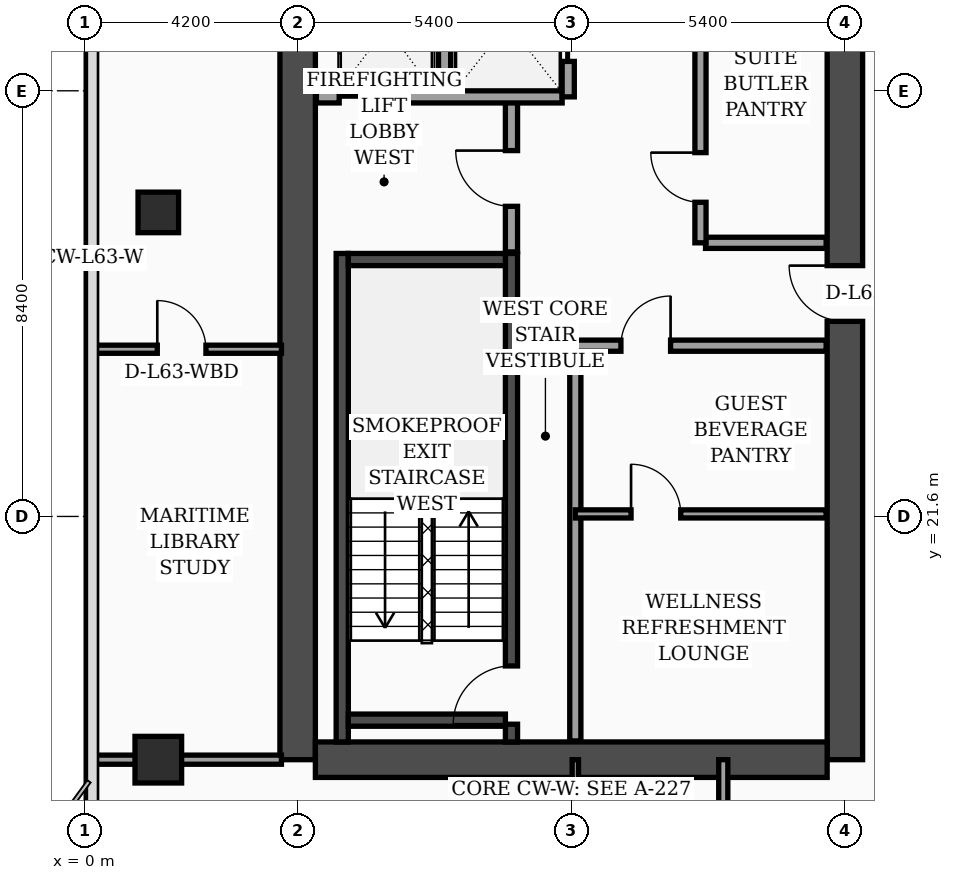
"""IFC4 building model, lengths in metres.
Left out: names, types, materials, properties, quantities, classifications, styles, units other than length and angle.
Written with IfcOpenShell. Run it as: python <this file> out.ifc"""

import sys

from ifc_helpers import new_model, si_unit, direction, frame, frame_2d, origin, origin_2d, place, context, subcontext, project, spatial, rectangle, extrude, element, fill, save


model = new_model("IFC4")
c1 = context("Model", 3, precision=1e-05, world=origin(), true_north=direction((0.0, 1.0)))
c2 = subcontext(c1, "Body", "Model", "MODEL_VIEW")
j1 = project(units=[si_unit("LENGTHUNIT", "METRE"), si_unit("PLANEANGLEUNIT", "RADIAN")], contexts=[c1])
p1 = place(None, origin())
s1 = spatial("IfcSite", under=j1, at=p1, CompositionType="ELEMENT")
p2 = place(p1, origin())
s2 = spatial("IfcBuilding", under=s1, at=p2, CompositionType="ELEMENT")
p3 = place(p2, frame((0.0, 0.0, 255.2)))
s3 = spatial("IfcBuildingStorey", under=s2, at=p3, CompositionType="ELEMENT", Elevation=255.2)
p4 = place(p3, frame((4.2, 16.8, 0.0), z_axis=(0.0, 0.0, 1.0), x_axis=(0.0, 1.0, 0.0)))
e1 = element("IfcWall", 1, at=p4, inside=s3, PredefinedType="SHEAR", context=c2, shape_type="SweptSolid", body=[
    extrude(rectangle(XDim=21.6, YDim=0.7, at=frame_2d((10.8, 0.0))), origin(), (0.0, 0.0, 1.0), 3.56),
])
p5 = place(p3, frame((15.0, 16.8, 0.0), z_axis=(0.0, 0.0, 1.0), x_axis=(0.0, 1.0, 0.0)))
e2 = element("IfcWall", 2, at=p5, inside=s3, PredefinedType="SHEAR", context=c2, shape_type="SweptSolid", body=[
    extrude(rectangle(XDim=21.6, YDim=0.7, at=frame_2d((10.8, 0.0))), origin(), (0.0, 0.0, 1.0), 3.56),
])
p6 = place(p5, frame((8.65, 0.0, 0.0)))
e3 = element("IfcOpeningElement", 3, at=p6, cuts=e2, PredefinedType="OPENING", context=c2, shape_type="SweptSolid", body=[
    extrude(rectangle(XDim=1.1, YDim=2.2, at=frame_2d((0.55, 1.1))), frame((0.0, 0.36, 0.0), z_axis=(0.0, -1.0, 0.0), x_axis=(1.0, 0.0, 0.0)), (0.0, 0.0, 1.0), 0.72),
])
p7 = place(p5, frame((18.9, 0.0, 0.0)))
e4 = element("IfcOpeningElement", 4, at=p7, cuts=e2, PredefinedType="OPENING", context=c2, shape_type="SweptSolid", body=[
    extrude(rectangle(XDim=1.1, YDim=2.2, at=frame_2d((0.55, 1.1))), frame((0.0, 0.36, 0.0), z_axis=(0.0, -1.0, 0.0), x_axis=(1.0, 0.0, 0.0)), (0.0, 0.0, 1.0), 0.72),
])
p8 = place(p3, frame((4.55, 16.8, 0.0), z_axis=(0.0, 0.0, 1.0), x_axis=(1.0, 0.0, 0.0)))
e5 = element("IfcWall", 5, at=p8, inside=s3, PredefinedType="SHEAR", context=c2, shape_type="SweptSolid", body=[
    extrude(rectangle(XDim=10.1, YDim=0.7, at=frame_2d((5.05, 0.0))), origin(), (0.0, 0.0, 1.0), 3.56),
])
p9 = place(p3, frame((5.08, 17.15, 0.0), z_axis=(0.0, 0.0, 1.0), x_axis=(0.0, 1.0, 0.0)))
e6 = element("IfcWall", 6, at=p9, inside=s3, PredefinedType="SOLIDWALL", context=c2, shape_type="SweptSolid", body=[
    extrude(rectangle(XDim=9.64, YDim=0.24, at=frame_2d((4.82, 0.0))), origin(), (0.0, 0.0, 1.0), 3.56),
])
p10 = place(p3, frame((8.42, 17.15, 0.0), z_axis=(0.0, 0.0, 1.0), x_axis=(0.0, 1.0, 0.0)))
e7 = element("IfcWall", 7, at=p10, inside=s3, PredefinedType="SOLIDWALL", context=c2, shape_type="SweptSolid", body=[
    extrude(rectangle(XDim=9.64, YDim=0.24, at=frame_2d((4.82, 0.0))), origin(), (0.0, 0.0, 1.0), 3.56),
])
p11 = place(p10, frame((0.35, 0.0, 0.0)))
e8 = element("IfcOpeningElement", 8, at=p11, cuts=e7, PredefinedType="OPENING", context=c2, shape_type="SweptSolid", body=[
    extrude(rectangle(XDim=1.15, YDim=2.2, at=frame_2d((0.575, 1.1))), frame((0.0, 0.13, 0.0), z_axis=(0.0, -1.0, 0.0), x_axis=(1.0, 0.0, 0.0)), (0.0, 0.0, 1.0), 0.26),
])
for number, where, z_axis, x_axis in (
    (9, (5.2, 17.58, 0.0), (0.0, 0.0, 1.0), (1.0, 0.0, 0.0)),
    (10, (5.2, 26.67, 0.0), (0.0, 0.0, 1.0), (1.0, 0.0, 0.0)),
):
    element("IfcWall", number, at=place(p3, frame(where, z_axis=z_axis, x_axis=x_axis)), inside=s3, PredefinedType="SOLIDWALL", context=c2, shape_type="SweptSolid", body=[
        extrude(rectangle(XDim=3.1, YDim=0.24, at=frame_2d((1.55, 0.0))), origin(), (0.0, 0.0, 1.0), 3.56),
    ])
p12 = place(p3, frame((1.45, 16.8, 0.0), z_axis=(0.0, 0.0, 1.0), x_axis=(1.0, 0.0, 0.0)))
e11 = element("IfcColumn", 11, at=p12, inside=s3, PredefinedType="COLUMN", context=c2, shape_type="SweptSolid", body=[
    extrude(rectangle(XDim=0.92, YDim=0.92, at=origin_2d()), origin(), (0.0, 0.0, 1.0), 3.56),
])
p13 = place(p3, frame((1.45, 27.6, 0.0), z_axis=(0.0, 0.0, 1.0), x_axis=(1.0, 0.0, 0.0)))
e12 = element("IfcColumn", 12, at=p13, inside=s3, PredefinedType="COLUMN", context=c2, shape_type="SweptSolid", body=[
    extrude(rectangle(XDim=0.8, YDim=0.8, at=origin_2d()), origin(), (0.0, 0.0, 1.0), 3.56),
])
p14 = place(p3, frame((8.42, 26.82, 0.0), z_axis=(0.0, 0.0, 1.0), x_axis=(0.0, 1.0, 0.0)))
e13 = element("IfcWall", 13, at=p14, inside=s3, PredefinedType="SOLIDWALL", context=c2, shape_type="SweptSolid", body=[
    extrude(rectangle(XDim=3.0, YDim=0.24, at=frame_2d((1.5, 0.0))), origin(), (0.0, 0.0, 1.0), 3.56),
])
p15 = place(p14, frame((0.9, 0.0, 0.0)))
e14 = element("IfcOpeningElement", 14, at=p15, cuts=e13, PredefinedType="OPENING", context=c2, shape_type="SweptSolid", body=[
    extrude(rectangle(XDim=1.1, YDim=2.2, at=frame_2d((0.55, 1.1))), frame((0.0, 0.13, 0.0), z_axis=(0.0, -1.0, 0.0), x_axis=(1.0, 0.0, 0.0)), (0.0, 0.0, 1.0), 0.26),
])
p16 = place(p3, frame((4.57, 29.88, 0.0), z_axis=(0.0, 0.0, 1.0), x_axis=(1.0, 0.0, 0.0)))
e15 = element("IfcWall", 15, at=p16, inside=s3, PredefinedType="SOLIDWALL", context=c2, shape_type="SweptSolid", body=[
    extrude(rectangle(XDim=4.85, YDim=0.24, at=frame_2d((2.425, 0.0))), origin(), (0.0, 0.0, 1.0), 3.56),
])
p17 = place(p16, frame((0.45, 0.0, 0.0)))
e16 = element("IfcOpeningElement", 16, at=p17, cuts=e15, PredefinedType="OPENING", context=c2, shape_type="SweptSolid", body=[
    extrude(rectangle(XDim=1.3, YDim=2.35, at=frame_2d((0.65, 1.175))), frame((0.0, 0.13, 0.0), z_axis=(0.0, -1.0, 0.0), x_axis=(1.0, 0.0, 0.0)), (0.0, 0.0, 1.0), 0.26),
])
p18 = place(p3, frame((7.1, 30.02, 0.0), z_axis=(0.0, 0.0, 1.0), x_axis=(0.0, 1.0, 0.0)))
e17 = element("IfcWall", 17, at=p18, inside=s3, PredefinedType="SOLIDWALL", context=c2, shape_type="SweptSolid", body=[
    extrude(rectangle(XDim=2.63, YDim=0.24, at=frame_2d((1.315, 0.0))), origin(), (0.0, 0.0, 1.0), 3.56),
])
p19 = place(p3, frame((9.54, 29.88, 0.0), z_axis=(0.0, 0.0, 1.0), x_axis=(0.0, 1.0, 0.0)))
e18 = element("IfcWall", 18, at=p19, inside=s3, PredefinedType="SOLIDWALL", context=c2, shape_type="SweptSolid", body=[
    extrude(rectangle(XDim=2.9, YDim=0.24, at=frame_2d((1.45, 0.0))), origin(), (0.0, 0.0, 1.0), 3.56),
])
p20 = place(p19, frame((0.7, 0.0, 0.0)))
e19 = element("IfcOpeningElement", 19, at=p20, cuts=e18, PredefinedType="OPENING", context=c2, shape_type="SweptSolid", body=[
    extrude(rectangle(XDim=1.3, YDim=2.35, at=frame_2d((0.65, 1.175))), frame((0.0, 0.13, 0.0), z_axis=(0.0, -1.0, 0.0), x_axis=(1.0, 0.0, 0.0)), (0.0, 0.0, 1.0), 0.26),
])
p21 = place(p3, frame((9.68, 17.17, 0.0), z_axis=(0.0, 0.0, 1.0), x_axis=(0.0, 1.0, 0.0)))
e20 = element("IfcWall", 20, at=p21, inside=s3, PredefinedType="SOLIDWALL", context=c2, shape_type="SweptSolid", body=[
    extrude(rectangle(XDim=7.83, YDim=0.22, at=frame_2d((3.915, 0.0))), origin(), (0.0, 0.0, 1.0), 3.56),
])
p22 = place(p3, frame((9.68, 21.65, 0.0), z_axis=(0.0, 0.0, 1.0), x_axis=(1.0, 0.0, 0.0)))
e21 = element("IfcWall", 21, at=p22, inside=s3, PredefinedType="PARTITIONING", context=c2, shape_type="SweptSolid", body=[
    extrude(rectangle(XDim=4.95, YDim=0.16, at=frame_2d((2.475, 0.0))), origin(), (0.0, 0.0, 1.0), 3.09),
])
p23 = place(p22, frame((1.1, 0.0, 0.0)))
e22 = element("IfcOpeningElement", 22, at=p23, cuts=e21, PredefinedType="OPENING", context=c2, shape_type="SweptSolid", body=[
    extrude(rectangle(XDim=0.98, YDim=2.15, at=frame_2d((0.49, 1.075))), frame((0.0, 0.09, 0.0), z_axis=(0.0, -1.0, 0.0), x_axis=(1.0, 0.0, 0.0)), (0.0, 0.0, 1.0), 0.18),
])
p24 = place(p3, frame((9.68, 24.97, 0.0), z_axis=(0.0, 0.0, 1.0), x_axis=(1.0, 0.0, 0.0)))
e23 = element("IfcWall", 23, at=p24, inside=s3, PredefinedType="SOLIDWALL", context=c2, shape_type="SweptSolid", body=[
    extrude(rectangle(XDim=4.95, YDim=0.22, at=frame_2d((2.475, 0.0))), origin(), (0.0, 0.0, 1.0), 2.99),
])
p25 = place(p24, frame((0.9, 0.0, 0.0)))
e24 = element("IfcOpeningElement", 24, at=p25, cuts=e23, PredefinedType="OPENING", context=c2, shape_type="SweptSolid", body=[
    extrude(rectangle(XDim=0.98, YDim=2.15, at=frame_2d((0.49, 1.075))), frame((0.0, 0.12, 0.0), z_axis=(0.0, -1.0, 0.0), x_axis=(1.0, 0.0, 0.0)), (0.0, 0.0, 1.0), 0.24),
])
p26 = place(p3, frame((12.25, 27.0, 0.0), z_axis=(0.0, 0.0, 1.0), x_axis=(1.0, 0.0, 0.0)))
e25 = element("IfcWall", 25, at=p26, inside=s3, PredefinedType="SOLIDWALL", context=c2, shape_type="SweptSolid", body=[
    extrude(rectangle(XDim=2.38, YDim=0.22, at=frame_2d((1.19, 0.0))), origin(), (0.0, 0.0, 1.0), 3.56),
])
p27 = place(p3, frame((12.15, 27.0, 0.0), z_axis=(0.0, 0.0, 1.0), x_axis=(0.0, 1.0, 0.0)))
e26 = element("IfcWall", 26, at=p27, inside=s3, PredefinedType="SOLIDWALL", context=c2, shape_type="SweptSolid", body=[
    extrude(rectangle(XDim=7.75, YDim=0.22, at=frame_2d((3.875, 0.0))), origin(), (0.0, 0.0, 1.0), 3.56),
])
p28 = place(p27, frame((0.8, 0.0, 0.0)))
e27 = element("IfcOpeningElement", 27, at=p28, cuts=e26, PredefinedType="OPENING", context=c2, shape_type="SweptSolid", body=[
    extrude(rectangle(XDim=0.98, YDim=2.15, at=frame_2d((0.49, 1.075))), frame((0.0, 0.12, 0.0), z_axis=(0.0, -1.0, 0.0), x_axis=(1.0, 0.0, 0.0)), (0.0, 0.0, 1.0), 0.24),
])
p29 = place(p3, frame((0.08, 24.9, 0.0), z_axis=(0.0, 0.0, 1.0), x_axis=(1.0, 0.0, 0.0)))
e28 = element("IfcWall", 28, at=p29, inside=s3, PredefinedType="PARTITIONING", context=c2, shape_type="SweptSolid", body=[
    extrude(rectangle(XDim=3.8, YDim=0.16, at=frame_2d((1.9, 0.0))), origin(), (0.0, 0.0, 1.0), 3.09),
])
p30 = place(p29, frame((1.35, 0.0, 0.0)))
e29 = element("IfcOpeningElement", 29, at=p30, cuts=e28, PredefinedType="OPENING", context=c2, shape_type="SweptSolid", body=[
    extrude(rectangle(XDim=0.96, YDim=2.2, at=frame_2d((0.48, 1.1))), frame((0.0, 0.09, 0.0), z_axis=(0.0, -1.0, 0.0), x_axis=(1.0, 0.0, 0.0)), (0.0, 0.0, 1.0), 0.18),
])
p31 = place(p3, frame((0.08, 16.8, 0.0), z_axis=(0.0, 0.0, 1.0), x_axis=(1.0, 0.0, 0.0)))
e30 = element("IfcWall", 30, at=p31, inside=s3, PredefinedType="PARTITIONING", context=c2, shape_type="SweptSolid", body=[
    extrude(rectangle(XDim=3.8, YDim=0.18, at=frame_2d((1.9, 0.0))), origin(), (0.0, 0.0, 1.0), 2.99),
])
p32 = place(p3, frame((9.68, 14.75, 0.0), z_axis=(0.0, 0.0, 1.0), x_axis=(0.0, 1.0, 0.0)))
e31 = element("IfcWall", 31, at=p32, inside=s3, PredefinedType="PARTITIONING", context=c2, shape_type="SweptSolid", body=[
    extrude(rectangle(XDim=2.05, YDim=0.125, at=frame_2d((1.025, 0.0))), origin(), (0.0, 0.0, 1.0), 3.56),
])
p33 = place(p3, frame((12.6, 2.44, 0.0), z_axis=(0.0, 0.0, 1.0), x_axis=(0.0, 1.0, 0.0)))
e32 = element("IfcWall", 32, at=p33, inside=s3, PredefinedType="PARTITIONING", context=c2, shape_type="SweptSolid", body=[
    extrude(rectangle(XDim=14.36, YDim=0.18, at=frame_2d((7.18, 0.0))), origin(), (0.0, 0.0, 1.0), 2.99),
])
p34 = place(p33, frame((3.01, 0.0, 0.0)))
e33 = element("IfcOpeningElement", 33, at=p34, cuts=e32, PredefinedType="OPENING", context=c2, shape_type="SweptSolid", body=[
    extrude(rectangle(XDim=1.02, YDim=2.2, at=frame_2d((0.51, 1.1))), frame((0.0, 0.1, 0.0), z_axis=(0.0, -1.0, 0.0), x_axis=(1.0, 0.0, 0.0)), (0.0, 0.0, 1.0), 0.2),
])
p35 = place(p33, frame((9.95, 0.0, 0.0)))
e34 = element("IfcOpeningElement", 34, at=p35, cuts=e32, PredefinedType="OPENING", context=c2, shape_type="SweptSolid", body=[
    extrude(rectangle(XDim=1.02, YDim=2.2, at=frame_2d((0.51, 1.1))), frame((0.0, 0.1, 0.0), z_axis=(0.0, -1.0, 0.0), x_axis=(1.0, 0.0, 0.0)), (0.0, 0.0, 1.0), 0.2),
])
p36 = place(p15, origin())
e35 = element("IfcDoor", 35, at=p36, inside=s3, OperationType="SINGLE_SWING_RIGHT", PredefinedType="DOOR", context=c2, shape_type="SweptSolid", body=[
    extrude(rectangle(XDim=1.1, YDim=2.2, at=frame_2d((0.55, 1.1))), frame((0.0, 0.025, 0.0), z_axis=(0.0, -1.0, 0.0), x_axis=(1.0, 0.0, 0.0)), (0.0, 0.0, 1.0), 0.05),
])
fill(e14, e35)
p37 = place(p17, origin())
e36 = element("IfcDoor", 36, at=p37, inside=s3, OperationType="DOUBLE_DOOR_SLIDING", PredefinedType="DOOR", context=c2, shape_type="SweptSolid", body=[
    extrude(rectangle(XDim=1.3, YDim=2.35, at=frame_2d((0.65, 1.175))), frame((0.0, 0.025, 0.0), z_axis=(0.0, -1.0, 0.0), x_axis=(1.0, 0.0, 0.0)), (0.0, 0.0, 1.0), 0.05),
])
fill(e16, e36)
p38 = place(p20, origin())
e37 = element("IfcDoor", 37, at=p38, inside=s3, OperationType="DOUBLE_DOOR_SLIDING", PredefinedType="DOOR", context=c2, shape_type="SweptSolid", body=[
    extrude(rectangle(XDim=1.3, YDim=2.35, at=frame_2d((0.65, 1.175))), frame((0.0, 0.025, 0.0), z_axis=(0.0, -1.0, 0.0), x_axis=(1.0, 0.0, 0.0)), (0.0, 0.0, 1.0), 0.05),
])
fill(e19, e37)
p39 = place(p23, origin())
e38 = element("IfcDoor", 38, at=p39, inside=s3, OperationType="SINGLE_SWING_LEFT", PredefinedType="DOOR", context=c2, shape_type="SweptSolid", body=[
    extrude(rectangle(XDim=0.98, YDim=2.15, at=frame_2d((0.49, 1.075))), frame((0.0, 0.025, 0.0), z_axis=(0.0, -1.0, 0.0), x_axis=(1.0, 0.0, 0.0)), (0.0, 0.0, 1.0), 0.05),
])
fill(e22, e38)
p40 = place(p25, origin())
e39 = element("IfcDoor", 39, at=p40, inside=s3, OperationType="SINGLE_SWING_RIGHT", PredefinedType="DOOR", context=c2, shape_type="SweptSolid", body=[
    extrude(rectangle(XDim=0.98, YDim=2.15, at=frame_2d((0.49, 1.075))), frame((0.0, 0.025, 0.0), z_axis=(0.0, -1.0, 0.0), x_axis=(1.0, 0.0, 0.0)), (0.0, 0.0, 1.0), 0.05),
])
fill(e24, e39)
p41 = place(p28, origin())
e40 = element("IfcDoor", 40, at=p41, inside=s3, OperationType="SINGLE_SWING_RIGHT", PredefinedType="DOOR", context=c2, shape_type="SweptSolid", body=[
    extrude(rectangle(XDim=0.98, YDim=2.15, at=frame_2d((0.49, 1.075))), frame((0.0, 0.025, 0.0), z_axis=(0.0, -1.0, 0.0), x_axis=(1.0, 0.0, 0.0)), (0.0, 0.0, 1.0), 0.05),
])
fill(e27, e40)
p42 = place(p30, origin())
e41 = element("IfcDoor", 41, at=p42, inside=s3, OperationType="SINGLE_SWING_LEFT", PredefinedType="DOOR", context=c2, shape_type="SweptSolid", body=[
    extrude(rectangle(XDim=0.96, YDim=2.2, at=frame_2d((0.48, 1.1))), frame((0.0, 0.025, 0.0), z_axis=(0.0, -1.0, 0.0), x_axis=(1.0, 0.0, 0.0)), (0.0, 0.0, 1.0), 0.05),
])
fill(e29, e41)
p43 = place(p11, origin())
e42 = element("IfcDoor", 42, at=p43, inside=s3, OperationType="SINGLE_SWING_LEFT", PredefinedType="DOOR", context=c2, shape_type="SweptSolid", body=[
    extrude(rectangle(XDim=1.15, YDim=2.2, at=frame_2d((0.575, 1.1))), frame((0.0, 0.025, 0.0), z_axis=(0.0, -1.0, 0.0), x_axis=(1.0, 0.0, 0.0)), (0.0, 0.0, 1.0), 0.05),
])
fill(e8, e42)
p44 = place(p6, origin())
e43 = element("IfcDoor", 43, at=p44, inside=s3, OperationType="SINGLE_SWING_RIGHT", PredefinedType="DOOR", context=c2, shape_type="SweptSolid", body=[
    extrude(rectangle(XDim=1.1, YDim=2.2, at=frame_2d((0.55, 1.1))), frame((0.0, 0.025, 0.0), z_axis=(0.0, -1.0, 0.0), x_axis=(1.0, 0.0, 0.0)), (0.0, 0.0, 1.0), 0.05),
])
fill(e3, e43)
save(model, sys.argv[1])
